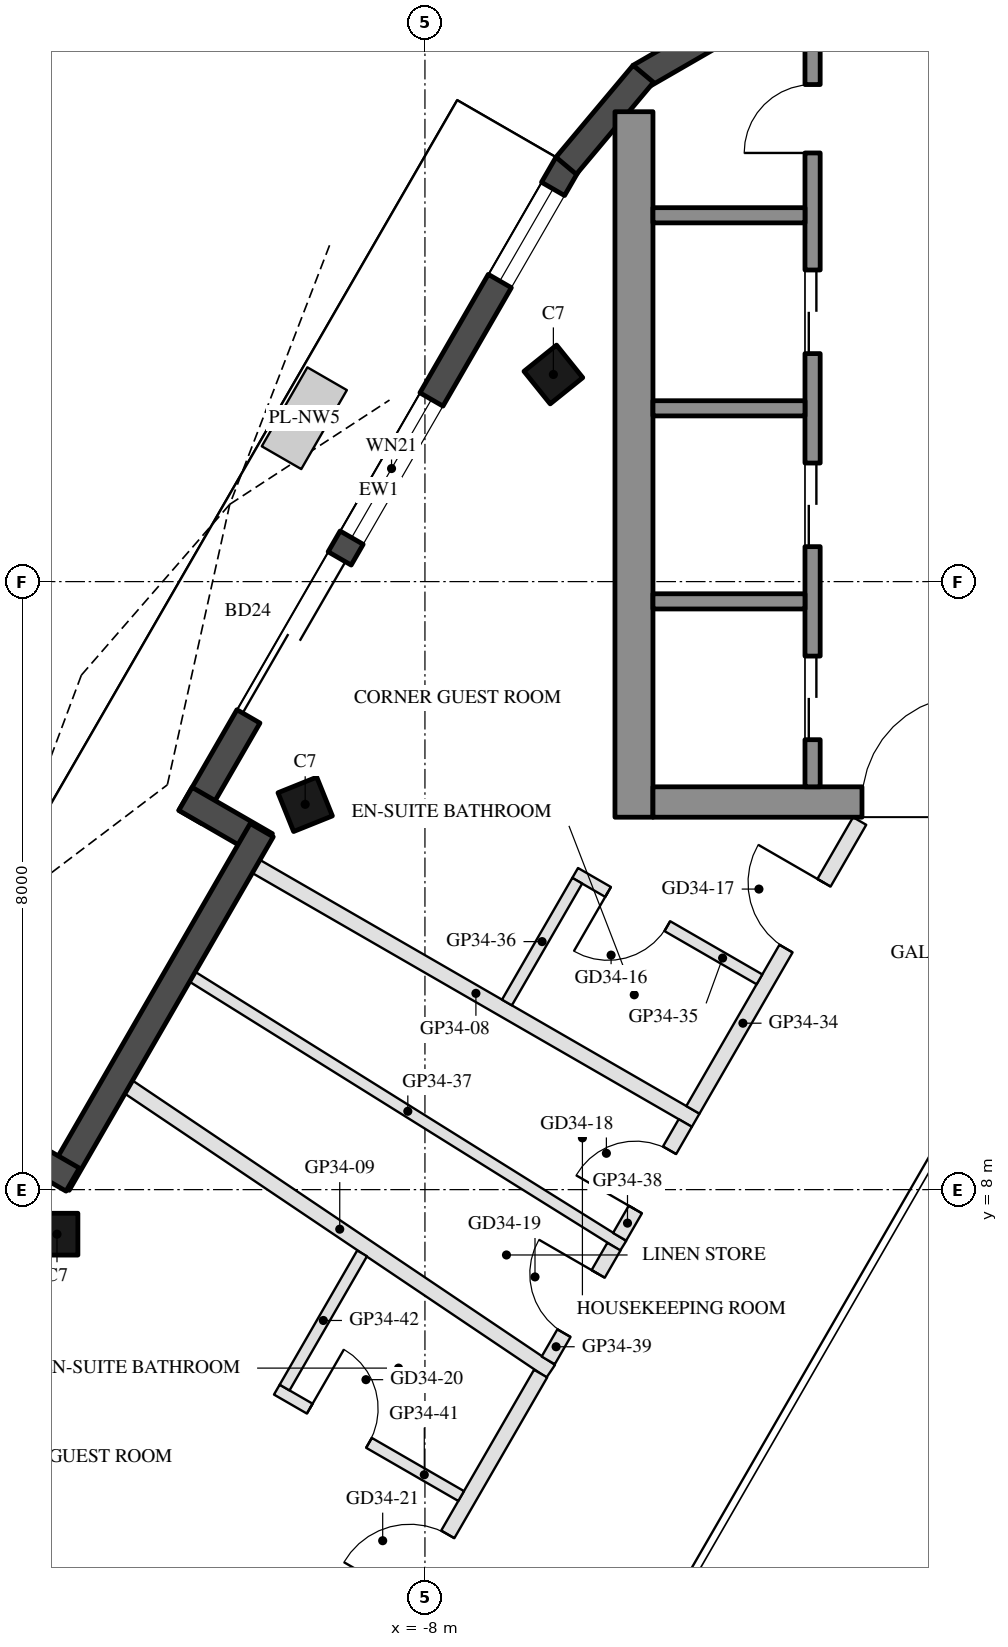
"""IFC4 building model, lengths in metres.
Left out: names, types, materials, properties, quantities, classifications, styles, units other than length and angle.
Written with IfcOpenShell. Run it as: python <this file> out.ifc"""

import sys

from ifc_helpers import new_model, si_unit, direction, frame, frame_2d, origin, origin_2d, place, context, subcontext, project, spatial, rectangle, hollow_rectangle, extrude, boolean, halfspace, element, fill, save


model = new_model("IFC4")
c1 = context("Model", 3, precision=1e-05, world=origin(), true_north=direction((0.0, 1.0)))
c2 = subcontext(c1, "Body", "Model", "MODEL_VIEW")
j1 = project(units=[si_unit("LENGTHUNIT", "METRE"), si_unit("PLANEANGLEUNIT", "RADIAN")], contexts=[c1])
p1 = place(None, origin())
s1 = spatial("IfcSite", under=j1, at=p1, CompositionType="ELEMENT")
p2 = place(p1, origin())
s2 = spatial("IfcBuilding", under=s1, at=p2, CompositionType="ELEMENT")
p3 = place(p2, frame((0.0, 0.0, 320.7)))
s3 = spatial("IfcBuildingStorey", under=s2, at=p3, CompositionType="ELEMENT", Elevation=320.7)
p4 = place(p3, frame((-6.31, 18.725, 0.0), z_axis=(0.069729210429, -0.17998811977, 0.981194228456), x_axis=(0.504140775731, 0.855098670829, 0.121030332527)))
e1 = element("IfcColumn", 1, at=p4, inside=s3, PredefinedType="COLUMN", context=c2, shape_type="SweptSolid", body=[
    boolean("DIFFERENCE", boolean("DIFFERENCE", extrude(hollow_rectangle(XDim=0.55, YDim=0.55, WallThickness=0.025, at=origin_2d()), origin(), (0.0, 0.0, 1.0), 3.771), halfspace(frame((0.0, 0.0, 0.04), z_axis=(0.0, 0.0, 1.0), x_axis=(1.0, 0.0, 0.0)), True)), halfspace(frame((0.0, 0.0, 3.731), z_axis=(0.0, 0.0, 1.0), x_axis=(1.0, 0.0, 0.0)), False)),
])
p5 = place(p3, frame((-9.576, 13.07, 0.0), z_axis=(0.100582464937, -0.128315882454, 0.986619583252), x_axis=(0.502859866582, 0.862221844537, 0.060872369628)))
e2 = element("IfcColumn", 2, at=p5, inside=s3, PredefinedType="COLUMN", context=c2, shape_type="SweptSolid", body=[
    boolean("DIFFERENCE", boolean("DIFFERENCE", extrude(hollow_rectangle(XDim=0.55, YDim=0.55, WallThickness=0.025, at=origin_2d()), origin(), (0.0, 0.0, 1.0), 3.75), halfspace(frame((0.0, 0.0, 0.034), z_axis=(0.0, 0.0, 1.0), x_axis=(1.0, 0.0, 0.0)), True)), halfspace(frame((0.0, 0.0, 3.716), z_axis=(0.0, 0.0, 1.0), x_axis=(1.0, 0.0, 0.0)), False)),
])
p6 = place(p3, frame((-12.841, 7.414, 0.0), z_axis=(0.1312281915, -0.075788846185, 0.9884509156), x_axis=(-0.500239345249, -0.865887173376, 2.1159167e-05)))
e3 = element("IfcColumn", 3, at=p6, inside=s3, PredefinedType="COLUMN", context=c2, shape_type="SweptSolid", body=[
    boolean("DIFFERENCE", boolean("DIFFERENCE", extrude(hollow_rectangle(XDim=0.55, YDim=0.55, WallThickness=0.025, at=origin_2d()), origin(), (0.0, 0.0, 1.0), 3.743), halfspace(frame((0.0, 0.0, 0.031), z_axis=(0.0, 0.0, 1.0), x_axis=(1.0, 0.0, 0.0)), True)), halfspace(frame((0.0, 0.0, 3.712), z_axis=(0.0, 0.0, 1.0), x_axis=(1.0, 0.0, 0.0)), False)),
])
p7 = place(p3, frame((-6.125, 21.497, 0.0), z_axis=(0.0, 0.0, 1.0), x_axis=(-0.500002137087, -0.866024169933, 0.0)))
e4 = element("IfcWall", 4, at=p7, inside=s3, PredefinedType="SOLIDWALL", context=c2, shape_type="SweptSolid", body=[
    extrude(rectangle(XDim=9.924, YDim=0.35, at=frame_2d((4.962, 0.0))), origin(), (0.0, 0.0, 1.0), 3.55),
])
p8 = place(p7, frame((0.381, 0.0, 0.3)))
e5 = element("IfcOpeningElement", 5, at=p8, cuts=e4, PredefinedType="OPENING", context=c2, shape_type="SweptSolid", body=[
    extrude(rectangle(XDim=1.4, YDim=2.65, at=frame_2d((0.7, 1.325))), frame((0.0, 0.185, 0.0), z_axis=(0.0, -1.0, 0.0), x_axis=(1.0, 0.0, 0.0)), (0.0, 0.0, 1.0), 0.37),
])
p9 = place(p7, frame((5.995, 0.0, 0.0)))
e6 = element("IfcOpeningElement", 6, at=p9, cuts=e4, PredefinedType="OPENING", context=c2, shape_type="SweptSolid", body=[
    extrude(rectangle(XDim=2.4, YDim=2.4, at=frame_2d((1.2, 1.2))), frame((0.0, 0.185, 0.0), z_axis=(0.0, -1.0, 0.0), x_axis=(1.0, 0.0, 0.0)), (0.0, 0.0, 1.0), 0.37),
])
p10 = place(p7, frame((3.58, 0.0, 0.3)))
e7 = element("IfcOpeningElement", 7, at=p10, cuts=e4, PredefinedType="OPENING", context=c2, shape_type="SweptSolid", body=[
    extrude(rectangle(XDim=2.1, YDim=2.65, at=frame_2d((1.05, 1.325))), frame((0.0, 0.185, 0.0), z_axis=(0.0, -1.0, 0.0), x_axis=(1.0, 0.0, 0.0)), (0.0, 0.0, 1.0), 0.37),
])
p11 = place(p3, frame((-11.151, 13.142, 0.0), z_axis=(0.0, 0.0, 1.0), x_axis=(0.866005645448, -0.500034220881, 0.0)))
e8 = element("IfcWall", 8, at=p11, inside=s3, PredefinedType="SOLIDWALL", context=c2, shape_type="SweptSolid", body=[
    extrude(rectangle(XDim=1.22, YDim=0.35, at=frame_2d((0.61, 0.0))), origin(), (0.0, 0.0, 1.0), 3.55),
])
p12 = place(p3, frame((-10.147, 12.73, 0.0), z_axis=(0.0, 0.0, 1.0), x_axis=(-0.499996591357, -0.866027371756, 0.0)))
e9 = element("IfcWall", 9, at=p12, inside=s3, PredefinedType="SOLIDWALL", context=c2, shape_type="SweptSolid", body=[
    extrude(rectangle(XDim=5.371, YDim=0.35, at=frame_2d((2.685, 0.0))), origin(), (0.0, 0.0, 1.0), 3.55),
])
p13 = place(p3, frame((-12.634, 8.132, 0.0), z_axis=(0.0, 0.0, 1.0), x_axis=(-0.866005645448, 0.500034220881, 0.0)))
e10 = element("IfcWall", 10, at=p13, inside=s3, PredefinedType="SOLIDWALL", context=c2, shape_type="SweptSolid", body=[
    extrude(rectangle(XDim=1.22, YDim=0.35, at=frame_2d((0.61, 0.0))), origin(), (0.0, 0.0, 1.0), 3.55),
])
for number, where, z_axis, x_axis in (
    (11, (-3.806, 23.432, 0.0), (0.0, 0.0, 1.0), (-0.866, -0.5, 0.0)),
    (12, (-5.127, 22.681, 0.0), (0.0, 0.0, 1.0), (-0.643, -0.766, 0.0)),
):
    element("IfcWall", number, at=place(p3, frame(where, z_axis=z_axis, x_axis=x_axis)), inside=s3, PredefinedType="SOLIDWALL", context=c2, shape_type="SweptSolid", body=[
        extrude(rectangle(XDim=1.579, YDim=0.35, at=frame_2d((0.79, 0.0))), origin(), (0.0, 0.0, 1.0), 3.55),
    ])
p14 = place(p3, frame((-5.25, 12.9, 0.0), z_axis=(0.0, 0.0, 1.0), x_axis=(0.0, 1.0, 0.0)))
e13 = element("IfcWall", 13, at=p14, inside=s3, PredefinedType="SHEAR", context=c2, shape_type="SweptSolid", body=[
    extrude(rectangle(XDim=9.283, YDim=0.5, at=frame_2d((4.641, 0.0))), origin(), (0.0, 0.0, 1.0), 3.5),
])
p15 = place(p3, frame((5.0, 13.1, 0.0), z_axis=(0.0, 0.0, 1.0), x_axis=(-1.0, 0.0, 0.0)))
e14 = element("IfcWall", 14, at=p15, inside=s3, PredefinedType="SHEAR", context=c2, shape_type="SweptSolid", body=[
    extrude(rectangle(XDim=10.0, YDim=0.4, at=frame_2d((5.0, 0.0))), origin(), (0.0, 0.0, 1.0), 3.5),
])
p16 = place(p15, frame((3.55, 0.0, 0.0)))
e15 = element("IfcOpeningElement", 15, at=p16, cuts=e14, PredefinedType="OPENING", context=c2, shape_type="SweptSolid", body=[
    extrude(rectangle(XDim=1.1, YDim=2.1, at=frame_2d((0.55, 1.05))), frame((0.0, 0.21, 0.0), z_axis=(0.0, -1.0, 0.0), x_axis=(1.0, 0.0, 0.0)), (0.0, 0.0, 1.0), 0.42),
])
p17 = place(p15, frame((5.85, 0.0, 0.0)))
e16 = element("IfcOpeningElement", 16, at=p17, cuts=e14, PredefinedType="OPENING", context=c2, shape_type="SweptSolid", body=[
    extrude(rectangle(XDim=1.4, YDim=2.1, at=frame_2d((0.7, 1.05))), frame((0.0, 0.21, 0.0), z_axis=(0.0, -1.0, 0.0), x_axis=(1.0, 0.0, 0.0)), (0.0, 0.0, 1.0), 0.42),
])
p18 = place(p3, frame((-2.9, 13.3, 0.0), z_axis=(0.0, 0.0, 1.0), x_axis=(0.0, 1.0, 0.0)))
e17 = element("IfcWall", 17, at=p18, inside=s3, PredefinedType="SHEAR", context=c2, shape_type="SweptSolid", body=[
    extrude(rectangle(XDim=10.121, YDim=0.2, at=frame_2d((5.061, 0.0))), origin(), (0.0, 0.0, 1.0), 3.5),
])
p19 = place(p18, frame((0.62, 0.0, 0.0)))
e18 = element("IfcOpeningElement", 18, at=p19, cuts=e17, PredefinedType="OPENING", context=c2, shape_type="SweptSolid", body=[
    extrude(rectangle(XDim=1.1, YDim=2.1, at=frame_2d((0.55, 1.05))), frame((0.0, 0.11, 0.0), z_axis=(0.0, -1.0, 0.0), x_axis=(1.0, 0.0, 0.0)), (0.0, 0.0, 1.0), 0.22),
])
p20 = place(p18, frame((3.16, 0.0, 0.0)))
e19 = element("IfcOpeningElement", 19, at=p20, cuts=e17, PredefinedType="OPENING", context=c2, shape_type="SweptSolid", body=[
    extrude(rectangle(XDim=1.1, YDim=2.1, at=frame_2d((0.55, 1.05))), frame((0.0, 0.11, 0.0), z_axis=(0.0, -1.0, 0.0), x_axis=(1.0, 0.0, 0.0)), (0.0, 0.0, 1.0), 0.22),
])
p21 = place(p18, frame((5.7, 0.0, 0.0)))
e20 = element("IfcOpeningElement", 20, at=p21, cuts=e17, PredefinedType="OPENING", context=c2, shape_type="SweptSolid", body=[
    extrude(rectangle(XDim=1.1, YDim=2.1, at=frame_2d((0.55, 1.05))), frame((0.0, 0.11, 0.0), z_axis=(0.0, -1.0, 0.0), x_axis=(1.0, 0.0, 0.0)), (0.0, 0.0, 1.0), 0.22),
])
p22 = place(p18, frame((8.34, 0.0, 0.0)))
e21 = element("IfcOpeningElement", 21, at=p22, cuts=e17, PredefinedType="OPENING", context=c2, shape_type="SweptSolid", body=[
    extrude(rectangle(XDim=0.9, YDim=2.1, at=frame_2d((0.45, 1.05))), frame((0.0, 0.11, 0.0), z_axis=(0.0, -1.0, 0.0), x_axis=(1.0, 0.0, 0.0)), (0.0, 0.0, 1.0), 0.22),
])
for number, where, z_axis, x_axis in (
    (22, (-3.0, 15.74, 0.0), (0.0, 0.0, 1.0), (-1.0, 0.0, 0.0)),
    (23, (-3.0, 18.28, 0.0), (0.0, 0.0, 1.0), (-1.0, 0.0, 0.0)),
    (24, (-3.0, 20.82, 0.0), (0.0, 0.0, 1.0), (-1.0, 0.0, 0.0)),
):
    element("IfcWall", number, at=place(p3, frame(where, z_axis=z_axis, x_axis=x_axis)), inside=s3, PredefinedType="SHEAR", context=c2, shape_type="SweptSolid", body=[
        extrude(rectangle(XDim=2.0, YDim=0.2, at=frame_2d((1.0, 0.0))), origin(), (0.0, 0.0, 1.0), 3.5),
    ])
p23 = place(p3, frame((-10.221, 12.252, 0.0), z_axis=(0.0, 0.0, 1.0), x_axis=(0.866020588255, -0.50000834065, 0.0)))
e25 = element("IfcWall", 25, at=p23, inside=s3, PredefinedType="PARTITIONING", context=c2, shape_type="SweptSolid", body=[
    extrude(rectangle(XDim=6.678, YDim=0.2, at=frame_2d((3.339, 0.0))), origin(), (0.0, 0.0, 1.0), 3.1),
])
p24 = place(p3, frame((-11.897, 9.349, 0.0), z_axis=(0.0, 0.0, 1.0), x_axis=(0.829476932463, -0.558540972992, 0.0)))
e26 = element("IfcWall", 26, at=p24, inside=s3, PredefinedType="PARTITIONING", context=c2, shape_type="SweptSolid", body=[
    extrude(rectangle(XDim=6.693, YDim=0.2, at=frame_2d((3.347, 0.0))), origin(), (0.0, 0.0, 1.0), 3.1),
])
p25 = place(p3, frame((-16.165, 3.756, 0.0), z_axis=(0.0, 0.0, 1.0), x_axis=(0.905429632533, -0.42449638459, 0.0)))
e27 = element("IfcWall", 27, at=p25, inside=s3, PredefinedType="PARTITIONING", context=c2, shape_type="SweptSolid", body=[
    extrude(rectangle(XDim=7.605, YDim=0.2, at=frame_2d((3.802, 0.0))), origin(), (0.0, 0.0, 1.0), 3.1),
])
p26 = place(p3, frame((-4.475, 9.05, 0.0), z_axis=(0.0, 0.0, 1.0), x_axis=(0.499998569178, 0.866026229868, 0.0)))
e28 = element("IfcWall", 28, at=p26, inside=s3, PredefinedType="PARTITIONING", context=c2, shape_type="SweptSolid", body=[
    extrude(rectangle(XDim=4.388, YDim=0.2, at=frame_2d((2.194, 0.0))), origin(), (0.0, 0.0, 1.0), 3.15),
])
p27 = place(p26, frame((2.45, 0.0, 0.0)))
e29 = element("IfcOpeningElement", 29, at=p27, cuts=e28, PredefinedType="OPENING", context=c2, shape_type="SweptSolid", body=[
    extrude(rectangle(XDim=1.0, YDim=2.1, at=frame_2d((0.5, 1.05))), frame((0.0, 0.11, 0.0), z_axis=(0.0, -1.0, 0.0), x_axis=(1.0, 0.0, 0.0)), (0.0, 0.0, 1.0), 0.22),
])
p28 = place(p3, frame((-3.599, 10.767, 0.0), z_axis=(0.0, 0.0, 1.0), x_axis=(-0.866056369097, 0.49994636267, 0.0)))
e30 = element("IfcWall", 30, at=p28, inside=s3, PredefinedType="PARTITIONING", context=c2, shape_type="SweptSolid", body=[
    extrude(rectangle(XDim=2.8, YDim=0.15, at=frame_2d((1.4, 0.0))), origin(), (0.0, 0.0, 1.0), 3.55),
])
p29 = place(p28, frame((1.4, 0.0, 0.0)))
e31 = element("IfcOpeningElement", 31, at=p29, cuts=e30, PredefinedType="OPENING", context=c2, shape_type="SweptSolid", body=[
    extrude(rectangle(XDim=0.9, YDim=2.1, at=frame_2d((0.45, 1.05))), frame((0.0, 0.085, 0.0), z_axis=(0.0, -1.0, 0.0), x_axis=(1.0, 0.0, 0.0)), (0.0, 0.0, 1.0), 0.17),
])
p30 = place(p3, frame((-5.996, 12.064, 0.0), z_axis=(0.0, 0.0, 1.0), x_axis=(-0.499985172903, -0.866033964044, 0.0)))
e32 = element("IfcWall", 32, at=p30, inside=s3, PredefinedType="PARTITIONING", context=c2, shape_type="SweptSolid", body=[
    extrude(rectangle(XDim=1.85, YDim=0.15, at=frame_2d((0.925, 0.0))), origin(), (0.0, 0.0, 1.0), 3.15),
])
p31 = place(p3, frame((-11.059, 10.8, 0.0), z_axis=(0.0, 0.0, 1.0), x_axis=(0.848240447151, -0.529611313906, 0.0)))
e33 = element("IfcWall", 33, at=p31, inside=s3, PredefinedType="PARTITIONING", context=c2, shape_type="SweptSolid", body=[
    extrude(rectangle(XDim=6.681, YDim=0.15, at=frame_2d((3.341, 0.0))), origin(), (0.0, 0.0, 1.0), 3.1),
])
p32 = place(p3, frame((-5.439, 7.38, 0.0), z_axis=(0.0, 0.0, 1.0), x_axis=(0.499922180863, 0.866070328023, 0.0)))
e34 = element("IfcWall", 34, at=p32, inside=s3, PredefinedType="PARTITIONING", context=c2, shape_type="SweptSolid", body=[
    extrude(rectangle(XDim=1.728, YDim=0.2, at=frame_2d((0.864, 0.0))), origin(), (0.0, 0.0, 1.0), 3.55),
])
p33 = place(p32, frame((0.414, 0.0, 0.0)))
e35 = element("IfcOpeningElement", 35, at=p33, cuts=e34, PredefinedType="OPENING", context=c2, shape_type="SweptSolid", body=[
    extrude(rectangle(XDim=0.9, YDim=2.1, at=frame_2d((0.45, 1.05))), frame((0.0, 0.11, 0.0), z_axis=(0.0, -1.0, 0.0), x_axis=(1.0, 0.0, 0.0)), (0.0, 0.0, 1.0), 0.22),
])
p34 = place(p3, frame((-6.378, 5.753, 0.0), z_axis=(0.0, 0.0, 1.0), x_axis=(0.499983348498, 0.86603501732, 0.0)))
e36 = element("IfcWall", 36, at=p34, inside=s3, PredefinedType="PARTITIONING", context=c2, shape_type="SweptSolid", body=[
    extrude(rectangle(XDim=1.728, YDim=0.2, at=frame_2d((0.864, 0.0))), origin(), (0.0, 0.0, 1.0), 3.15),
])
p35 = place(p34, frame((0.414, 0.0, 0.0)))
e37 = element("IfcOpeningElement", 37, at=p35, cuts=e36, PredefinedType="OPENING", context=c2, shape_type="SweptSolid", body=[
    extrude(rectangle(XDim=0.9, YDim=2.1, at=frame_2d((0.45, 1.05))), frame((0.0, 0.11, 0.0), z_axis=(0.0, -1.0, 0.0), x_axis=(1.0, 0.0, 0.0)), (0.0, 0.0, 1.0), 0.22),
])
p36 = place(p3, frame((-9.32, 0.657, 0.0), z_axis=(0.0, 0.0, 1.0), x_axis=(0.500014943438, 0.866016776015, 0.0)))
e38 = element("IfcWall", 38, at=p36, inside=s3, PredefinedType="PARTITIONING", context=c2, shape_type="SweptSolid", body=[
    extrude(rectangle(XDim=5.684, YDim=0.2, at=frame_2d((2.842, 0.0))), origin(), (0.0, 0.0, 1.0), 3.15),
])
p37 = place(p36, frame((2.241, 0.0, 0.0)))
e39 = element("IfcOpeningElement", 39, at=p37, cuts=e38, PredefinedType="OPENING", context=c2, shape_type="SweptSolid", body=[
    extrude(rectangle(XDim=1.0, YDim=2.1, at=frame_2d((0.5, 1.05))), frame((0.0, 0.11, 0.0), z_axis=(0.0, -1.0, 0.0), x_axis=(1.0, 0.0, 0.0)), (0.0, 0.0, 1.0), 0.22),
])
p38 = place(p3, frame((-9.949, 5.368, 0.0), z_axis=(0.0, 0.0, 1.0), x_axis=(0.866018616679, -0.500011755427, 0.0)))
e40 = element("IfcWall", 40, at=p38, inside=s3, PredefinedType="PARTITIONING", context=c2, shape_type="SweptSolid", body=[
    extrude(rectangle(XDim=2.8, YDim=0.15, at=frame_2d((1.4, 0.0))), origin(), (0.0, 0.0, 1.0), 3.55),
])
p39 = place(p38, frame((0.5, 0.0, 0.0)))
e41 = element("IfcOpeningElement", 41, at=p39, cuts=e40, PredefinedType="OPENING", context=c2, shape_type="SweptSolid", body=[
    extrude(rectangle(XDim=0.9, YDim=2.1, at=frame_2d((0.45, 1.05))), frame((0.0, 0.085, 0.0), z_axis=(0.0, -1.0, 0.0), x_axis=(1.0, 0.0, 0.0)), (0.0, 0.0, 1.0), 0.17),
])
p40 = place(p3, frame((-8.827, 7.161, 0.0), z_axis=(0.0, 0.0, 1.0), x_axis=(-0.499926356982, -0.866067917426, 0.0)))
e42 = element("IfcWall", 42, at=p40, inside=s3, PredefinedType="PARTITIONING", context=c2, shape_type="SweptSolid", body=[
    extrude(rectangle(XDim=2.038, YDim=0.15, at=frame_2d((1.019, 0.0))), origin(), (0.0, 0.0, 1.0), 3.15),
])
p41 = place(p8, origin())
e43 = element("IfcWindow", 43, at=p41, inside=s3, PartitioningType="SINGLE_PANEL", PredefinedType="WINDOW", context=c2, shape_type="SweptSolid", body=[
    extrude(rectangle(XDim=1.4, YDim=2.65, at=frame_2d((0.7, 1.325))), frame((0.0, 0.03, 0.0), z_axis=(0.0, -1.0, 0.0), x_axis=(1.0, 0.0, 0.0)), (0.0, 0.0, 1.0), 0.06),
])
fill(e5, e43)
p42 = place(p9, frame((2.4, 0.0, 0.0), z_axis=(0.0, 0.0, 1.0), x_axis=(-1.0, 0.0, 0.0)))
e44 = element("IfcDoor", 44, at=p42, inside=s3, OperationType="SLIDING_TO_LEFT", PredefinedType="DOOR", context=c2, shape_type="SweptSolid", body=[
    extrude(rectangle(XDim=2.4, YDim=2.4, at=frame_2d((1.2, 1.2))), frame((0.0, 0.025, 0.0), z_axis=(0.0, -1.0, 0.0), x_axis=(1.0, 0.0, 0.0)), (0.0, 0.0, 1.0), 0.05),
])
fill(e6, e44)
p43 = place(p10, origin())
e45 = element("IfcWindow", 45, at=p43, inside=s3, PartitioningType="SINGLE_PANEL", PredefinedType="WINDOW", context=c2, shape_type="SweptSolid", body=[
    extrude(rectangle(XDim=2.1, YDim=2.65, at=frame_2d((1.05, 1.325))), frame((0.0, 0.03, 0.0), z_axis=(0.0, -1.0, 0.0), x_axis=(1.0, 0.0, 0.0)), (0.0, 0.0, 1.0), 0.06),
])
fill(e7, e45)
p44 = place(p19, origin())
e46 = element("IfcDoor", 46, at=p44, inside=s3, OperationType="DOUBLE_DOOR_SLIDING", PredefinedType="DOOR", context=c2, shape_type="SweptSolid", body=[
    extrude(rectangle(XDim=1.1, YDim=2.1, at=frame_2d((0.55, 1.05))), frame((0.0, 0.025, 0.0), z_axis=(0.0, -1.0, 0.0), x_axis=(1.0, 0.0, 0.0)), (0.0, 0.0, 1.0), 0.05),
])
fill(e18, e46)
p45 = place(p20, origin())
e47 = element("IfcDoor", 47, at=p45, inside=s3, OperationType="DOUBLE_DOOR_SLIDING", PredefinedType="DOOR", context=c2, shape_type="SweptSolid", body=[
    extrude(rectangle(XDim=1.1, YDim=2.1, at=frame_2d((0.55, 1.05))), frame((0.0, 0.025, 0.0), z_axis=(0.0, -1.0, 0.0), x_axis=(1.0, 0.0, 0.0)), (0.0, 0.0, 1.0), 0.05),
])
fill(e19, e47)
p46 = place(p21, origin())
e48 = element("IfcDoor", 48, at=p46, inside=s3, OperationType="DOUBLE_DOOR_SLIDING", PredefinedType="DOOR", context=c2, shape_type="SweptSolid", body=[
    extrude(rectangle(XDim=1.1, YDim=2.1, at=frame_2d((0.55, 1.05))), frame((0.0, 0.025, 0.0), z_axis=(0.0, -1.0, 0.0), x_axis=(1.0, 0.0, 0.0)), (0.0, 0.0, 1.0), 0.05),
])
fill(e20, e48)
p47 = place(p22, origin())
e49 = element("IfcDoor", 49, at=p47, inside=s3, OperationType="SINGLE_SWING_LEFT", PredefinedType="DOOR", context=c2, shape_type="SweptSolid", body=[
    extrude(rectangle(XDim=0.9, YDim=2.1, at=frame_2d((0.45, 1.05))), frame((0.0, 0.025, 0.0), z_axis=(0.0, -1.0, 0.0), x_axis=(1.0, 0.0, 0.0)), (0.0, 0.0, 1.0), 0.05),
])
fill(e21, e49)
p48 = place(p17, frame((1.4, 0.0, 0.0), z_axis=(0.0, 0.0, 1.0), x_axis=(-1.0, 0.0, 0.0)))
e50 = element("IfcDoor", 50, at=p48, inside=s3, OperationType="DOUBLE_DOOR_SINGLE_SWING", PredefinedType="DOOR", context=c2, shape_type="SweptSolid", body=[
    extrude(rectangle(XDim=1.4, YDim=2.1, at=frame_2d((0.7, 1.05))), frame((0.0, 0.025, 0.0), z_axis=(0.0, -1.0, 0.0), x_axis=(1.0, 0.0, 0.0)), (0.0, 0.0, 1.0), 0.05),
])
fill(e16, e50)
p49 = place(p29, origin())
e51 = element("IfcDoor", 51, at=p49, inside=s3, OperationType="SINGLE_SWING_RIGHT", PredefinedType="DOOR", context=c2, shape_type="SweptSolid", body=[
    extrude(rectangle(XDim=0.9, YDim=2.1, at=frame_2d((0.45, 1.05))), frame((0.0, 0.025, 0.0), z_axis=(0.0, -1.0, 0.0), x_axis=(1.0, 0.0, 0.0)), (0.0, 0.0, 1.0), 0.05),
])
fill(e31, e51)
p50 = place(p27, origin())
e52 = element("IfcDoor", 52, at=p50, inside=s3, OperationType="SINGLE_SWING_RIGHT", PredefinedType="DOOR", context=c2, shape_type="SweptSolid", body=[
    extrude(rectangle(XDim=1.0, YDim=2.1, at=frame_2d((0.5, 1.05))), frame((0.0, 0.025, 0.0), z_axis=(0.0, -1.0, 0.0), x_axis=(1.0, 0.0, 0.0)), (0.0, 0.0, 1.0), 0.05),
])
fill(e29, e52)
p51 = place(p33, origin())
e53 = element("IfcDoor", 53, at=p51, inside=s3, OperationType="SINGLE_SWING_LEFT", PredefinedType="DOOR", context=c2, shape_type="SweptSolid", body=[
    extrude(rectangle(XDim=0.9, YDim=2.1, at=frame_2d((0.45, 1.05))), frame((0.0, 0.025, 0.0), z_axis=(0.0, -1.0, 0.0), x_axis=(1.0, 0.0, 0.0)), (0.0, 0.0, 1.0), 0.05),
])
fill(e35, e53)
p52 = place(p35, origin())
e54 = element("IfcDoor", 54, at=p52, inside=s3, OperationType="SINGLE_SWING_RIGHT", PredefinedType="DOOR", context=c2, shape_type="SweptSolid", body=[
    extrude(rectangle(XDim=0.9, YDim=2.1, at=frame_2d((0.45, 1.05))), frame((0.0, 0.025, 0.0), z_axis=(0.0, -1.0, 0.0), x_axis=(1.0, 0.0, 0.0)), (0.0, 0.0, 1.0), 0.05),
])
fill(e37, e54)
p53 = place(p39, origin())
e55 = element("IfcDoor", 55, at=p53, inside=s3, OperationType="SINGLE_SWING_LEFT", PredefinedType="DOOR", context=c2, shape_type="SweptSolid", body=[
    extrude(rectangle(XDim=0.9, YDim=2.1, at=frame_2d((0.45, 1.05))), frame((0.0, 0.025, 0.0), z_axis=(0.0, -1.0, 0.0), x_axis=(1.0, 0.0, 0.0)), (0.0, 0.0, 1.0), 0.05),
])
fill(e41, e55)
p54 = place(p37, origin())
e56 = element("IfcDoor", 56, at=p54, inside=s3, OperationType="SINGLE_SWING_LEFT", PredefinedType="DOOR", context=c2, shape_type="SweptSolid", body=[
    extrude(rectangle(XDim=1.0, YDim=2.1, at=frame_2d((0.5, 1.05))), frame((0.0, 0.025, 0.0), z_axis=(0.0, -1.0, 0.0), x_axis=(1.0, 0.0, 0.0)), (0.0, 0.0, 1.0), 0.05),
])
fill(e39, e56)
save(model, sys.argv[1])
